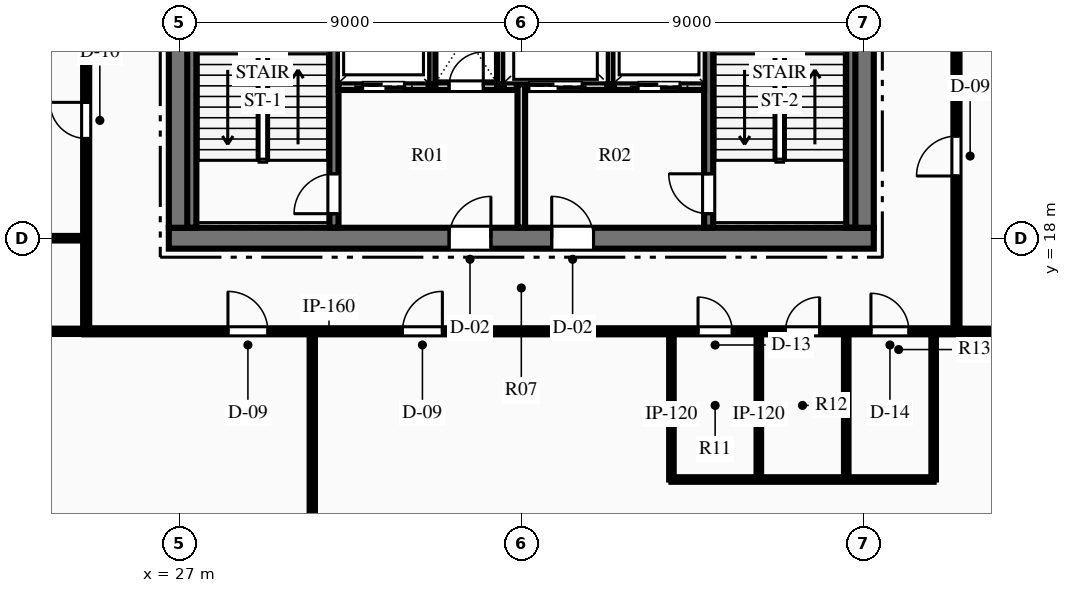
"""IFC4 building model, lengths in metres.
Left out: names, types, materials, properties, quantities, classifications, styles, units other than length and angle.
Written with IfcOpenShell. Run it as: python <this file> out.ifc"""

import sys

from ifc_helpers import new_model, si_unit, direction, frame, frame_2d, origin, place, context, subcontext, project, spatial, rectangle, extrude, element, fill, save


model = new_model("IFC4")
c1 = context("Model", 3, precision=1e-05, world=origin(), true_north=direction((0.0, 1.0)))
c2 = subcontext(c1, "Body", "Model", "MODEL_VIEW")
j1 = project(units=[si_unit("LENGTHUNIT", "METRE"), si_unit("PLANEANGLEUNIT", "RADIAN")], contexts=[c1])
p1 = place(None, origin())
s1 = spatial("IfcSite", under=j1, at=p1, CompositionType="ELEMENT")
p2 = place(p1, origin())
s2 = spatial("IfcBuilding", under=s1, at=p2, CompositionType="ELEMENT")
p3 = place(p2, frame((0.0, 0.0, 127.95)))
s3 = spatial("IfcBuildingStorey", under=s2, at=p3, CompositionType="ELEMENT", Elevation=127.95)
p4 = place(p3, frame((26.725, 18.0, 0.0), z_axis=(0.0, 0.0, 1.0), x_axis=(1.0, 0.0, 0.0)))
e1 = element("IfcWall", 1, at=p4, inside=s3, PredefinedType="SHEAR", context=c2, shape_type="SweptSolid", body=[
    extrude(rectangle(XDim=18.55, YDim=0.55, at=frame_2d((9.275, 0.0))), origin(), (0.0, 0.0, 1.0), 3.75),
])
p5 = place(p4, frame((7.375, 0.0, 0.0)))
e2 = element("IfcOpeningElement", 2, at=p5, cuts=e1, PredefinedType="OPENING", context=c2, shape_type="SweptSolid", body=[
    extrude(rectangle(XDim=1.1, YDim=2.15, at=frame_2d((0.55, 1.075))), frame((0.0, 0.285, 0.0), z_axis=(0.0, -1.0, 0.0), x_axis=(1.0, 0.0, 0.0)), (0.0, 0.0, 1.0), 0.57),
])
p6 = place(p4, frame((10.075, 0.0, 0.0)))
e3 = element("IfcOpeningElement", 3, at=p6, cuts=e1, PredefinedType="OPENING", context=c2, shape_type="SweptSolid", body=[
    extrude(rectangle(XDim=1.1, YDim=2.15, at=frame_2d((0.55, 1.075))), frame((0.0, 0.285, 0.0), z_axis=(0.0, -1.0, 0.0), x_axis=(1.0, 0.0, 0.0)), (0.0, 0.0, 1.0), 0.57),
])
p7 = place(p3, frame((27.0, 18.275, 0.0), z_axis=(0.0, 0.0, 1.0), x_axis=(0.0, 1.0, 0.0)))
e4 = element("IfcWall", 4, at=p7, inside=s3, PredefinedType="SHEAR", context=c2, shape_type="SweptSolid", body=[
    extrude(rectangle(XDim=15.45, YDim=0.55, at=frame_2d((7.725, 0.0))), origin(), (0.0, 0.0, 1.0), 3.75),
])
p8 = place(p7, frame((9.965, 0.0, 0.0)))
e5 = element("IfcOpeningElement", 5, at=p8, cuts=e4, PredefinedType="OPENING", context=c2, shape_type="SweptSolid", body=[
    extrude(rectangle(XDim=1.4, YDim=2.2, at=frame_2d((0.7, 1.1))), frame((0.0, 0.285, 0.0), z_axis=(0.0, -1.0, 0.0), x_axis=(1.0, 0.0, 0.0)), (0.0, 0.0, 1.0), 0.57),
])
p9 = place(p3, frame((45.0, 18.275, 0.0), z_axis=(0.0, 0.0, 1.0), x_axis=(0.0, 1.0, 0.0)))
e6 = element("IfcWall", 6, at=p9, inside=s3, PredefinedType="SHEAR", context=c2, shape_type="SweptSolid", body=[
    extrude(rectangle(XDim=15.45, YDim=0.55, at=frame_2d((7.725, 0.0))), origin(), (0.0, 0.0, 1.0), 3.75),
])
p10 = place(p9, frame((9.965, 0.0, 0.0)))
e7 = element("IfcOpeningElement", 7, at=p10, cuts=e6, PredefinedType="OPENING", context=c2, shape_type="SweptSolid", body=[
    extrude(rectangle(XDim=1.4, YDim=2.2, at=frame_2d((0.7, 1.1))), frame((0.0, 0.285, 0.0), z_axis=(0.0, -1.0, 0.0), x_axis=(1.0, 0.0, 0.0)), (0.0, 0.0, 1.0), 0.57),
])
p11 = place(p3, frame((31.07, 18.28, 0.0), z_axis=(0.0, 0.0, 1.0), x_axis=(0.0, 1.0, 0.0)))
e8 = element("IfcWall", 8, at=p11, inside=s3, PredefinedType="SHEAR", context=c2, shape_type="SweptSolid", body=[
    extrude(rectangle(XDim=8.26, YDim=0.24, at=frame_2d((4.13, 0.0))), origin(), (0.0, 0.0, 1.0), 3.75),
])
p12 = place(p11, frame((0.365, 0.0, 0.0)))
e9 = element("IfcOpeningElement", 9, at=p12, cuts=e8, PredefinedType="OPENING", context=c2, shape_type="SweptSolid", body=[
    extrude(rectangle(XDim=1.05, YDim=2.15, at=frame_2d((0.525, 1.075))), frame((0.0, 0.13, 0.0), z_axis=(0.0, -1.0, 0.0), x_axis=(1.0, 0.0, 0.0)), (0.0, 0.0, 1.0), 0.26),
])
p13 = place(p3, frame((27.33, 18.28, 0.0), z_axis=(0.0, 0.0, 1.0), x_axis=(0.0, 1.0, 0.0)))
e10 = element("IfcWall", 10, at=p13, inside=s3, PredefinedType="SHEAR", context=c2, shape_type="SweptSolid", body=[
    extrude(rectangle(XDim=8.26, YDim=0.24, at=frame_2d((4.13, 0.0))), origin(), (0.0, 0.0, 1.0), 3.75),
])
p14 = place(p3, frame((40.93, 18.28, 0.0), z_axis=(0.0, 0.0, 1.0), x_axis=(0.0, 1.0, 0.0)))
e11 = element("IfcWall", 11, at=p14, inside=s3, PredefinedType="SHEAR", context=c2, shape_type="SweptSolid", body=[
    extrude(rectangle(XDim=8.26, YDim=0.24, at=frame_2d((4.13, 0.0))), origin(), (0.0, 0.0, 1.0), 3.75),
])
p15 = place(p14, frame((0.365, 0.0, 0.0)))
e12 = element("IfcOpeningElement", 12, at=p15, cuts=e11, PredefinedType="OPENING", context=c2, shape_type="SweptSolid", body=[
    extrude(rectangle(XDim=1.05, YDim=2.15, at=frame_2d((0.525, 1.075))), frame((0.0, 0.13, 0.0), z_axis=(0.0, -1.0, 0.0), x_axis=(1.0, 0.0, 0.0)), (0.0, 0.0, 1.0), 0.26),
])
p16 = place(p3, frame((44.67, 18.28, 0.0), z_axis=(0.0, 0.0, 1.0), x_axis=(0.0, 1.0, 0.0)))
e13 = element("IfcWall", 13, at=p16, inside=s3, PredefinedType="SHEAR", context=c2, shape_type="SweptSolid", body=[
    extrude(rectangle(XDim=8.26, YDim=0.24, at=frame_2d((4.13, 0.0))), origin(), (0.0, 0.0, 1.0), 3.75),
])
p17 = place(p3, frame((36.0, 18.28, 0.0), z_axis=(0.0, 0.0, 1.0), x_axis=(0.0, 1.0, 0.0)))
e14 = element("IfcWall", 14, at=p17, inside=s3, PredefinedType="PARTITIONING", context=c2, shape_type="SweptSolid", body=[
    extrude(rectangle(XDim=3.77, YDim=0.2, at=frame_2d((1.885, 0.0))), origin(), (0.0, 0.0, 1.0), 3.4),
])
p18 = place(p3, frame((31.19, 22.0, 0.0), z_axis=(0.0, 0.0, 1.0), x_axis=(1.0, 0.0, 0.0)))
e15 = element("IfcWall", 15, at=p18, inside=s3, PredefinedType="PARTITIONING", context=c2, shape_type="SweptSolid", body=[
    extrude(rectangle(XDim=4.69, YDim=0.2, at=frame_2d((2.345, 0.0))), origin(), (0.0, 0.0, 1.0), 3.4),
])
p19 = place(p18, frame((2.91, 0.0, 0.0)))
e16 = element("IfcOpeningElement", 16, at=p19, cuts=e15, PredefinedType="OPENING", context=c2, shape_type="SweptSolid", body=[
    extrude(rectangle(XDim=0.9, YDim=2.15, at=frame_2d((0.45, 1.075))), frame((0.0, 0.11, 0.0), z_axis=(0.0, -1.0, 0.0), x_axis=(1.0, 0.0, 0.0)), (0.0, 0.0, 1.0), 0.22),
])
p20 = place(p18, frame((0.635, 0.0, 0.0)))
e17 = element("IfcOpeningElement", 17, at=p20, cuts=e15, PredefinedType="OPENING", context=c2, shape_type="SweptSolid", body=[
    extrude(rectangle(XDim=1.1, YDim=2.15, at=frame_2d((0.55, 1.075))), frame((0.0, 0.11, 0.0), z_axis=(0.0, -1.0, 0.0), x_axis=(1.0, 0.0, 0.0)), (0.0, 0.0, 1.0), 0.22),
])
p21 = place(p3, frame((36.12, 22.0, 0.0), z_axis=(0.0, 0.0, 1.0), x_axis=(1.0, 0.0, 0.0)))
e18 = element("IfcWall", 18, at=p21, inside=s3, PredefinedType="PARTITIONING", context=c2, shape_type="SweptSolid", body=[
    extrude(rectangle(XDim=4.69, YDim=0.2, at=frame_2d((2.345, 0.0))), origin(), (0.0, 0.0, 1.0), 3.4),
])
p22 = place(p21, frame((2.955, 0.0, 0.0)))
e19 = element("IfcOpeningElement", 19, at=p22, cuts=e18, PredefinedType="OPENING", context=c2, shape_type="SweptSolid", body=[
    extrude(rectangle(XDim=1.1, YDim=2.15, at=frame_2d((0.55, 1.075))), frame((0.0, 0.11, 0.0), z_axis=(0.0, -1.0, 0.0), x_axis=(1.0, 0.0, 0.0)), (0.0, 0.0, 1.0), 0.22),
])
p23 = place(p21, frame((0.08, 0.0, 0.0)))
e20 = element("IfcOpeningElement", 20, at=p23, cuts=e18, PredefinedType="OPENING", context=c2, shape_type="SweptSolid", body=[
    extrude(rectangle(XDim=1.4, YDim=2.2, at=frame_2d((0.7, 1.1))), frame((0.0, 0.11, 0.0), z_axis=(0.0, -1.0, 0.0), x_axis=(1.0, 0.0, 0.0)), (0.0, 0.0, 1.0), 0.22),
])
for number, where, z_axis, x_axis in (
    (21, (33.65, 22.05, 0.0), (0.0, 0.0, 1.0), (0.0, 1.0, 0.0)),
    (22, (35.45, 22.05, 0.0), (0.0, 0.0, 1.0), (0.0, 1.0, 0.0)),
    (23, (38.35, 22.05, 0.0), (0.0, 0.0, 1.0), (0.0, 1.0, 0.0)),
):
    element("IfcWall", number, at=place(p3, frame(where, z_axis=z_axis, x_axis=x_axis)), inside=s3, PredefinedType="PARTITIONING", context=c2, shape_type="SweptSolid", body=[
        extrude(rectangle(XDim=2.6, YDim=0.18, at=frame_2d((1.3, 0.0))), origin(), (0.0, 0.0, 1.0), 3.4),
    ])
p24 = place(p3, frame((24.5, 15.55, 0.0), z_axis=(0.0, 0.0, 1.0), x_axis=(1.0, 0.0, 0.0)))
e24 = element("IfcWall", 24, at=p24, inside=s3, PredefinedType="PARTITIONING", context=c2, shape_type="SweptSolid", body=[
    extrude(rectangle(XDim=23.0, YDim=0.16, at=frame_2d((11.5, 0.0))), origin(), (0.0, 0.0, 1.0), 3.4),
])
p25 = place(p24, frame((16.15, 0.0, 0.0)))
e25 = element("IfcOpeningElement", 25, at=p25, cuts=e24, PredefinedType="OPENING", context=c2, shape_type="SweptSolid", body=[
    extrude(rectangle(XDim=0.9, YDim=2.15, at=frame_2d((0.45, 1.075))), frame((0.0, 0.09, 0.0), z_axis=(0.0, -1.0, 0.0), x_axis=(1.0, 0.0, 0.0)), (0.0, 0.0, 1.0), 0.18),
])
p26 = place(p24, frame((18.45, 0.0, 0.0)))
e26 = element("IfcOpeningElement", 26, at=p26, cuts=e24, PredefinedType="OPENING", context=c2, shape_type="SweptSolid", body=[
    extrude(rectangle(XDim=0.9, YDim=2.15, at=frame_2d((0.45, 1.075))), frame((0.0, 0.09, 0.0), z_axis=(0.0, -1.0, 0.0), x_axis=(1.0, 0.0, 0.0)), (0.0, 0.0, 1.0), 0.18),
])
p27 = place(p24, frame((20.7, 0.0, 0.0)))
e27 = element("IfcOpeningElement", 27, at=p27, cuts=e24, PredefinedType="OPENING", context=c2, shape_type="SweptSolid", body=[
    extrude(rectangle(XDim=1.0, YDim=2.15, at=frame_2d((0.5, 1.075))), frame((0.0, 0.09, 0.0), z_axis=(0.0, -1.0, 0.0), x_axis=(1.0, 0.0, 0.0)), (0.0, 0.0, 1.0), 0.18),
])
p28 = place(p24, frame((3.781, 0.0, 0.0)))
e28 = element("IfcOpeningElement", 28, at=p28, cuts=e24, PredefinedType="OPENING", context=c2, shape_type="SweptSolid", body=[
    extrude(rectangle(XDim=1.05, YDim=2.15, at=frame_2d((0.525, 1.075))), frame((0.0, 0.09, 0.0), z_axis=(0.0, -1.0, 0.0), x_axis=(1.0, 0.0, 0.0)), (0.0, 0.0, 1.0), 0.18),
])
p29 = place(p24, frame((8.373, 0.0, 0.0)))
e29 = element("IfcOpeningElement", 29, at=p29, cuts=e24, PredefinedType="OPENING", context=c2, shape_type="SweptSolid", body=[
    extrude(rectangle(XDim=1.05, YDim=2.15, at=frame_2d((0.525, 1.075))), frame((0.0, 0.09, 0.0), z_axis=(0.0, -1.0, 0.0), x_axis=(1.0, 0.0, 0.0)), (0.0, 0.0, 1.0), 0.18),
])
p30 = place(p3, frame((24.55, 15.55, 0.0), z_axis=(0.0, 0.0, 1.0), x_axis=(0.0, 1.0, 0.0)))
e30 = element("IfcWall", 30, at=p30, inside=s3, PredefinedType="PARTITIONING", context=c2, shape_type="SweptSolid", body=[
    extrude(rectangle(XDim=20.9, YDim=0.16, at=frame_2d((10.45, 0.0))), origin(), (0.0, 0.0, 1.0), 3.4),
])
p31 = place(p30, frame((5.075, 0.0, 0.0)))
e31 = element("IfcOpeningElement", 31, at=p31, cuts=e30, PredefinedType="OPENING", context=c2, shape_type="SweptSolid", body=[
    extrude(rectangle(XDim=0.95, YDim=2.15, at=frame_2d((0.475, 1.075))), frame((0.0, 0.09, 0.0), z_axis=(0.0, -1.0, 0.0), x_axis=(1.0, 0.0, 0.0)), (0.0, 0.0, 1.0), 0.18),
])
p32 = place(p30, frame((12.524, 0.0, 0.0)))
e32 = element("IfcOpeningElement", 32, at=p32, cuts=e30, PredefinedType="OPENING", context=c2, shape_type="SweptSolid", body=[
    extrude(rectangle(XDim=1.05, YDim=2.15, at=frame_2d((0.525, 1.075))), frame((0.0, 0.09, 0.0), z_axis=(0.0, -1.0, 0.0), x_axis=(1.0, 0.0, 0.0)), (0.0, 0.0, 1.0), 0.18),
])
p33 = place(p3, frame((47.45, 15.55, 0.0), z_axis=(0.0, 0.0, 1.0), x_axis=(0.0, 1.0, 0.0)))
e33 = element("IfcWall", 33, at=p33, inside=s3, PredefinedType="PARTITIONING", context=c2, shape_type="SweptSolid", body=[
    extrude(rectangle(XDim=20.9, YDim=0.16, at=frame_2d((10.45, 0.0))), origin(), (0.0, 0.0, 1.0), 3.4),
])
p34 = place(p33, frame((4.087, 0.0, 0.0)))
e34 = element("IfcOpeningElement", 34, at=p34, cuts=e33, PredefinedType="OPENING", context=c2, shape_type="SweptSolid", body=[
    extrude(rectangle(XDim=1.05, YDim=2.15, at=frame_2d((0.525, 1.075))), frame((0.0, 0.09, 0.0), z_axis=(0.0, -1.0, 0.0), x_axis=(1.0, 0.0, 0.0)), (0.0, 0.0, 1.0), 0.18),
])
p35 = place(p33, frame((7.885, 0.0, 0.0)))
e35 = element("IfcOpeningElement", 35, at=p35, cuts=e33, PredefinedType="OPENING", context=c2, shape_type="SweptSolid", body=[
    extrude(rectangle(XDim=1.05, YDim=2.15, at=frame_2d((0.525, 1.075))), frame((0.0, 0.09, 0.0), z_axis=(0.0, -1.0, 0.0), x_axis=(1.0, 0.0, 0.0)), (0.0, 0.0, 1.0), 0.18),
])
p36 = place(p33, frame((14.743, 0.0, 0.0)))
e36 = element("IfcOpeningElement", 36, at=p36, cuts=e33, PredefinedType="OPENING", context=c2, shape_type="SweptSolid", body=[
    extrude(rectangle(XDim=1.05, YDim=2.15, at=frame_2d((0.525, 1.075))), frame((0.0, 0.09, 0.0), z_axis=(0.0, -1.0, 0.0), x_axis=(1.0, 0.0, 0.0)), (0.0, 0.0, 1.0), 0.18),
])
for number, where, z_axis, x_axis in (
    (37, (39.95, 11.65, 0.0), (0.0, 0.0, 1.0), (0.0, 1.0, 0.0)),
    (38, (42.25, 11.65, 0.0), (0.0, 0.0, 1.0), (0.0, 1.0, 0.0)),
    (39, (44.55, 11.65, 0.0), (0.0, 0.0, 1.0), (0.0, 1.0, 0.0)),
    (40, (46.85, 11.65, 0.0), (0.0, 0.0, 1.0), (0.0, 1.0, 0.0)),
):
    element("IfcWall", number, at=place(p3, frame(where, z_axis=z_axis, x_axis=x_axis)), inside=s3, PredefinedType="PARTITIONING", context=c2, shape_type="SweptSolid", body=[
        extrude(rectangle(XDim=3.9, YDim=0.12, at=frame_2d((1.95, 0.0))), origin(), (0.0, 0.0, 1.0), 3.4),
    ])
p37 = place(p3, frame((39.95, 11.65, 0.0), z_axis=(0.0, 0.0, 1.0), x_axis=(1.0, 0.0, 0.0)))
e41 = element("IfcWall", 41, at=p37, inside=s3, PredefinedType="PARTITIONING", context=c2, shape_type="SweptSolid", body=[
    extrude(rectangle(XDim=6.9, YDim=0.12, at=frame_2d((3.45, 0.0))), origin(), (0.0, 0.0, 1.0), 3.4),
])
p38 = place(p3, frame((12.352, 15.55, 0.0), z_axis=(0.0, 0.0, 1.0), x_axis=(1.0, 0.0, 0.0)))
e42 = element("IfcWall", 42, at=p38, inside=s3, PredefinedType="PARTITIONING", context=c2, shape_type="SweptSolid", body=[
    extrude(rectangle(XDim=12.198, YDim=0.14, at=frame_2d((6.099, 0.0))), origin(), (0.0, 0.0, 1.0), 3.4),
])
p39 = place(p38, frame((6.46, 0.0, 0.0)))
e43 = element("IfcOpeningElement", 43, at=p39, cuts=e42, PredefinedType="OPENING", context=c2, shape_type="SweptSolid", body=[
    extrude(rectangle(XDim=0.95, YDim=2.15, at=frame_2d((0.475, 1.075))), frame((0.0, 0.08, 0.0), z_axis=(0.0, -1.0, 0.0), x_axis=(1.0, 0.0, 0.0)), (0.0, 0.0, 1.0), 0.16),
])
p40 = place(p3, frame((47.45, 15.55, 0.0), z_axis=(0.0, 0.0, 1.0), x_axis=(1.0, 0.0, 0.0)))
e44 = element("IfcWall", 44, at=p40, inside=s3, PredefinedType="PARTITIONING", context=c2, shape_type="SweptSolid", body=[
    extrude(rectangle(XDim=19.094, YDim=0.14, at=frame_2d((9.547, 0.0))), origin(), (0.0, 0.0, 1.0), 3.4),
])
p41 = place(p3, frame((30.5, -5.176, 0.0), z_axis=(0.0, 0.0, 1.0), x_axis=(0.0, 1.0, 0.0)))
e45 = element("IfcWall", 45, at=p41, inside=s3, PredefinedType="PARTITIONING", context=c2, shape_type="SweptSolid", body=[
    extrude(rectangle(XDim=20.726, YDim=0.14, at=frame_2d((10.363, 0.0))), origin(), (0.0, 0.0, 1.0), 3.4),
])
p42 = place(p3, frame((47.45, 22.0, 0.0), z_axis=(0.0, 0.0, 1.0), x_axis=(1.0, 0.0, 0.0)))
e46 = element("IfcWall", 46, at=p42, inside=s3, PredefinedType="PARTITIONING", context=c2, shape_type="SweptSolid", body=[
    extrude(rectangle(XDim=20.508, YDim=0.14, at=frame_2d((10.254, 0.0))), origin(), (0.0, 0.0, 1.0), 3.4),
])
p43 = place(p3, frame((20.2, 18.0, 0.0), z_axis=(0.0, 0.0, 1.0), x_axis=(1.0, 0.0, 0.0)))
e47 = element("IfcWall", 47, at=p43, inside=s3, PredefinedType="PARTITIONING", context=c2, shape_type="SweptSolid", body=[
    extrude(rectangle(XDim=4.35, YDim=0.12, at=frame_2d((2.175, 0.0))), origin(), (0.0, 0.0, 1.0), 2.699),
])
p44 = place(p12, origin())
e48 = element("IfcDoor", 48, at=p44, inside=s3, OperationType="SINGLE_SWING_LEFT", PredefinedType="DOOR", context=c2, shape_type="SweptSolid", body=[
    extrude(rectangle(XDim=1.05, YDim=2.15, at=frame_2d((0.525, 1.075))), frame((0.0, 0.025, 0.0), z_axis=(0.0, -1.0, 0.0), x_axis=(1.0, 0.0, 0.0)), (0.0, 0.0, 1.0), 0.05),
])
fill(e9, e48)
p45 = place(p15, origin())
e49 = element("IfcDoor", 49, at=p45, inside=s3, OperationType="SINGLE_SWING_RIGHT", PredefinedType="DOOR", context=c2, shape_type="SweptSolid", body=[
    extrude(rectangle(XDim=1.05, YDim=2.15, at=frame_2d((0.525, 1.075))), frame((0.0, 0.025, 0.0), z_axis=(0.0, -1.0, 0.0), x_axis=(1.0, 0.0, 0.0)), (0.0, 0.0, 1.0), 0.05),
])
fill(e12, e49)
p46 = place(p5, origin())
e50 = element("IfcDoor", 50, at=p46, inside=s3, OperationType="SINGLE_SWING_RIGHT", PredefinedType="DOOR", context=c2, shape_type="SweptSolid", body=[
    extrude(rectangle(XDim=1.1, YDim=2.15, at=frame_2d((0.55, 1.075))), frame((0.0, 0.025, 0.0), z_axis=(0.0, -1.0, 0.0), x_axis=(1.0, 0.0, 0.0)), (0.0, 0.0, 1.0), 0.05),
])
fill(e2, e50)
p47 = place(p6, origin())
e51 = element("IfcDoor", 51, at=p47, inside=s3, OperationType="SINGLE_SWING_LEFT", PredefinedType="DOOR", context=c2, shape_type="SweptSolid", body=[
    extrude(rectangle(XDim=1.1, YDim=2.15, at=frame_2d((0.55, 1.075))), frame((0.0, 0.025, 0.0), z_axis=(0.0, -1.0, 0.0), x_axis=(1.0, 0.0, 0.0)), (0.0, 0.0, 1.0), 0.05),
])
fill(e3, e51)
p48 = place(p19, origin())
e52 = element("IfcDoor", 52, at=p48, inside=s3, OperationType="SINGLE_SWING_RIGHT", PredefinedType="DOOR", context=c2, shape_type="SweptSolid", body=[
    extrude(rectangle(XDim=0.9, YDim=2.15, at=frame_2d((0.45, 1.075))), frame((0.0, 0.025, 0.0), z_axis=(0.0, -1.0, 0.0), x_axis=(1.0, 0.0, 0.0)), (0.0, 0.0, 1.0), 0.05),
])
fill(e16, e52)
p49 = place(p25, origin())
e53 = element("IfcDoor", 53, at=p49, inside=s3, OperationType="SINGLE_SWING_LEFT", PredefinedType="DOOR", context=c2, shape_type="SweptSolid", body=[
    extrude(rectangle(XDim=0.9, YDim=2.15, at=frame_2d((0.45, 1.075))), frame((0.0, 0.025, 0.0), z_axis=(0.0, -1.0, 0.0), x_axis=(1.0, 0.0, 0.0)), (0.0, 0.0, 1.0), 0.05),
])
fill(e25, e53)
p50 = place(p26, origin())
e54 = element("IfcDoor", 54, at=p50, inside=s3, OperationType="SINGLE_SWING_RIGHT", PredefinedType="DOOR", context=c2, shape_type="SweptSolid", body=[
    extrude(rectangle(XDim=0.9, YDim=2.15, at=frame_2d((0.45, 1.075))), frame((0.0, 0.025, 0.0), z_axis=(0.0, -1.0, 0.0), x_axis=(1.0, 0.0, 0.0)), (0.0, 0.0, 1.0), 0.05),
])
fill(e26, e54)
p51 = place(p27, origin())
e55 = element("IfcDoor", 55, at=p51, inside=s3, OperationType="SINGLE_SWING_LEFT", PredefinedType="DOOR", context=c2, shape_type="SweptSolid", body=[
    extrude(rectangle(XDim=1.0, YDim=2.15, at=frame_2d((0.5, 1.075))), frame((0.0, 0.025, 0.0), z_axis=(0.0, -1.0, 0.0), x_axis=(1.0, 0.0, 0.0)), (0.0, 0.0, 1.0), 0.05),
])
fill(e27, e55)
p52 = place(p31, origin())
e56 = element("IfcDoor", 56, at=p52, inside=s3, OperationType="SINGLE_SWING_RIGHT", PredefinedType="DOOR", context=c2, shape_type="SweptSolid", body=[
    extrude(rectangle(XDim=0.95, YDim=2.15, at=frame_2d((0.475, 1.075))), frame((0.0, 0.025, 0.0), z_axis=(0.0, -1.0, 0.0), x_axis=(1.0, 0.0, 0.0)), (0.0, 0.0, 1.0), 0.05),
])
fill(e31, e56)
p53 = place(p28, origin())
e57 = element("IfcDoor", 57, at=p53, inside=s3, OperationType="SINGLE_SWING_LEFT", PredefinedType="DOOR", context=c2, shape_type="SweptSolid", body=[
    extrude(rectangle(XDim=1.05, YDim=2.15, at=frame_2d((0.525, 1.075))), frame((0.0, 0.025, 0.0), z_axis=(0.0, -1.0, 0.0), x_axis=(1.0, 0.0, 0.0)), (0.0, 0.0, 1.0), 0.05),
])
fill(e28, e57)
p54 = place(p29, origin())
e58 = element("IfcDoor", 58, at=p54, inside=s3, OperationType="SINGLE_SWING_RIGHT", PredefinedType="DOOR", context=c2, shape_type="SweptSolid", body=[
    extrude(rectangle(XDim=1.05, YDim=2.15, at=frame_2d((0.525, 1.075))), frame((0.0, 0.025, 0.0), z_axis=(0.0, -1.0, 0.0), x_axis=(1.0, 0.0, 0.0)), (0.0, 0.0, 1.0), 0.05),
])
fill(e29, e58)
p55 = place(p34, origin())
e59 = element("IfcDoor", 59, at=p55, inside=s3, OperationType="SINGLE_SWING_LEFT", PredefinedType="DOOR", context=c2, shape_type="SweptSolid", body=[
    extrude(rectangle(XDim=1.05, YDim=2.15, at=frame_2d((0.525, 1.075))), frame((0.0, 0.025, 0.0), z_axis=(0.0, -1.0, 0.0), x_axis=(1.0, 0.0, 0.0)), (0.0, 0.0, 1.0), 0.05),
])
fill(e34, e59)
p56 = place(p20, origin())
e60 = element("IfcDoor", 60, at=p56, inside=s3, OperationType="SLIDING_TO_LEFT", PredefinedType="DOOR", context=c2, shape_type="SweptSolid", body=[
    extrude(rectangle(XDim=1.1, YDim=2.15, at=frame_2d((0.55, 1.075))), frame((0.0, 0.025, 0.0), z_axis=(0.0, -1.0, 0.0), x_axis=(1.0, 0.0, 0.0)), (0.0, 0.0, 1.0), 0.05),
])
fill(e17, e60)
p57 = place(p22, origin())
e61 = element("IfcDoor", 61, at=p57, inside=s3, OperationType="SLIDING_TO_LEFT", PredefinedType="DOOR", context=c2, shape_type="SweptSolid", body=[
    extrude(rectangle(XDim=1.1, YDim=2.15, at=frame_2d((0.55, 1.075))), frame((0.0, 0.025, 0.0), z_axis=(0.0, -1.0, 0.0), x_axis=(1.0, 0.0, 0.0)), (0.0, 0.0, 1.0), 0.05),
])
fill(e19, e61)
p58 = place(p23, origin())
e62 = element("IfcDoor", 62, at=p58, inside=s3, OperationType="SLIDING_TO_LEFT", PredefinedType="DOOR", context=c2, shape_type="SweptSolid", body=[
    extrude(rectangle(XDim=1.4, YDim=2.2, at=frame_2d((0.7, 1.1))), frame((0.0, 0.025, 0.0), z_axis=(0.0, -1.0, 0.0), x_axis=(1.0, 0.0, 0.0)), (0.0, 0.0, 1.0), 0.05),
])
fill(e20, e62)
save(model, sys.argv[1])
